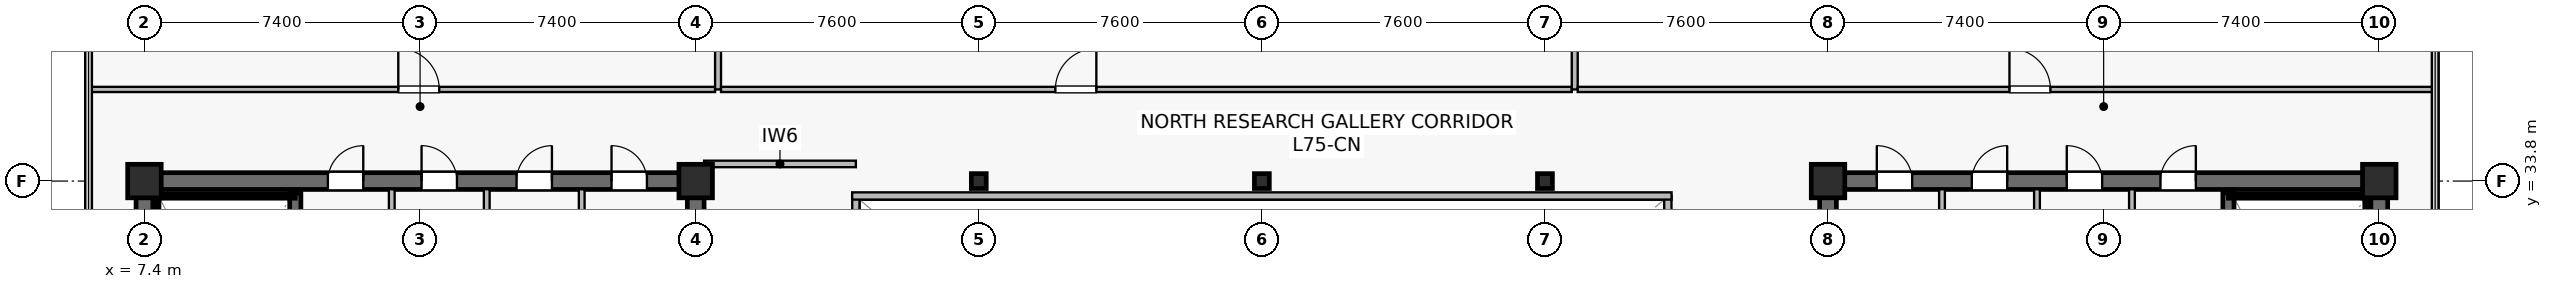
"""IFC4 building model, lengths in metres.
Left out: names, types, materials, properties, quantities, classifications, styles, units other than length and angle.
Written with IfcOpenShell. Run it as: python <this file> out.ifc"""

import sys

from ifc_helpers import new_model, si_unit, direction, frame, frame_2d, origin, origin_2d, place, context, subcontext, project, spatial, rectangle, i_section, extrude, source, transform, mapped, element, fill, save


model = new_model("IFC4")
c1 = context("Model", 3, precision=1e-05, world=origin(), true_north=direction((0.0, 1.0)))
c2 = subcontext(c1, "Body", "Model", "MODEL_VIEW")
j1 = project(units=[si_unit("LENGTHUNIT", "METRE"), si_unit("PLANEANGLEUNIT", "RADIAN")], contexts=[c1])
p1 = place(None, origin())
s1 = spatial("IfcSite", under=j1, at=p1, CompositionType="ELEMENT")
p2 = place(p1, origin())
s2 = spatial("IfcBuilding", under=s1, at=p2, CompositionType="ELEMENT")
p3 = place(p2, frame((0.0, 0.0, 314.4)))
s3 = spatial("IfcBuildingStorey", under=s2, at=p3, CompositionType="ELEMENT", Elevation=314.4)
p4 = place(p3, frame((7.175, 33.8, 0.0), z_axis=(0.0, 0.0, 1.0), x_axis=(1.0, 0.0, 0.0)))
e1 = element("IfcWall", 1, at=p4, inside=s3, PredefinedType="SHEAR", context=c2, shape_type="SweptSolid", body=[
    extrude(rectangle(XDim=15.25, YDim=0.45, at=frame_2d((7.625, 0.0))), origin(), (0.0, 0.0, 1.0), 3.9),
])
p5 = place(p4, frame((5.15, 0.0, 0.0)))
e2 = element("IfcOpeningElement", 2, at=p5, cuts=e1, PredefinedType="OPENING", context=c2, shape_type="SweptSolid", body=[
    extrude(rectangle(XDim=0.95, YDim=2.15, at=frame_2d((0.475, 1.075))), frame((0.0, 0.235, 0.0), z_axis=(0.0, -1.0, 0.0), x_axis=(1.0, 0.0, 0.0)), (0.0, 0.0, 1.0), 0.47),
])
p6 = place(p4, frame((7.665, 0.0, 0.0)))
e3 = element("IfcOpeningElement", 3, at=p6, cuts=e1, PredefinedType="OPENING", context=c2, shape_type="SweptSolid", body=[
    extrude(rectangle(XDim=0.95, YDim=2.15, at=frame_2d((0.475, 1.075))), frame((0.0, 0.235, 0.0), z_axis=(0.0, -1.0, 0.0), x_axis=(1.0, 0.0, 0.0)), (0.0, 0.0, 1.0), 0.47),
])
p7 = place(p4, frame((10.215, 0.0, 0.0)))
e4 = element("IfcOpeningElement", 4, at=p7, cuts=e1, PredefinedType="OPENING", context=c2, shape_type="SweptSolid", body=[
    extrude(rectangle(XDim=0.95, YDim=2.15, at=frame_2d((0.475, 1.075))), frame((0.0, 0.235, 0.0), z_axis=(0.0, -1.0, 0.0), x_axis=(1.0, 0.0, 0.0)), (0.0, 0.0, 1.0), 0.47),
])
p8 = place(p4, frame((12.765, 0.0, 0.0)))
e5 = element("IfcOpeningElement", 5, at=p8, cuts=e1, PredefinedType="OPENING", context=c2, shape_type="SweptSolid", body=[
    extrude(rectangle(XDim=0.95, YDim=2.15, at=frame_2d((0.475, 1.075))), frame((0.0, 0.235, 0.0), z_axis=(0.0, -1.0, 0.0), x_axis=(1.0, 0.0, 0.0)), (0.0, 0.0, 1.0), 0.47),
])
p9 = place(p3, frame((7.4, 15.025, 0.0), z_axis=(0.0, 0.0, 1.0), x_axis=(0.0, 1.0, 0.0)))
e6 = element("IfcWall", 6, at=p9, inside=s3, PredefinedType="SHEAR", context=c2, shape_type="SweptSolid", body=[
    extrude(rectangle(XDim=18.55, YDim=0.45, at=frame_2d((9.275, 0.0))), origin(), (0.0, 0.0, 1.0), 3.9),
])
p10 = place(p3, frame((22.2, 15.025, 0.0), z_axis=(0.0, 0.0, 1.0), x_axis=(0.0, 1.0, 0.0)))
e7 = element("IfcWall", 7, at=p10, inside=s3, PredefinedType="SHEAR", context=c2, shape_type="SweptSolid", body=[
    extrude(rectangle(XDim=18.55, YDim=0.45, at=frame_2d((9.275, 0.0))), origin(), (0.0, 0.0, 1.0), 3.9),
])
p11 = place(p10, frame((3.525, 0.0, 0.0)))
e8 = element("IfcOpeningElement", 8, at=p11, cuts=e7, PredefinedType="OPENING", context=c2, shape_type="SweptSolid", body=[
    extrude(rectangle(XDim=1.42, YDim=2.2, at=frame_2d((0.71, 1.1))), frame((0.0, 0.235, 0.0), z_axis=(0.0, -1.0, 0.0), x_axis=(1.0, 0.0, 0.0)), (0.0, 0.0, 1.0), 0.47),
])
p12 = place(p3, frame((11.45, 24.85, 0.0), z_axis=(0.0, 0.0, 1.0), x_axis=(0.0, 1.0, 0.0)))
e9 = element("IfcWall", 9, at=p12, inside=s3, PredefinedType="SHEAR", context=c2, shape_type="SweptSolid", body=[
    extrude(rectangle(XDim=8.63, YDim=0.3, at=frame_2d((4.315, 0.0))), origin(), (0.0, 0.0, 1.0), 3.9),
])
p13 = place(p12, frame((0.42, 0.0, 0.0)))
e10 = element("IfcOpeningElement", 10, at=p13, cuts=e9, PredefinedType="OPENING", context=c2, shape_type="SweptSolid", body=[
    extrude(rectangle(XDim=1.1, YDim=2.15, at=frame_2d((0.55, 1.075))), frame((0.0, 0.16, 0.0), z_axis=(0.0, -1.0, 0.0), x_axis=(1.0, 0.0, 0.0)), (0.0, 0.0, 1.0), 0.32),
])
p14 = place(p3, frame((7.73, 33.4, 0.0), z_axis=(0.0, 0.0, 1.0), x_axis=(1.0, 0.0, 0.0)))
e11 = element("IfcWall", 11, at=p14, inside=s3, PredefinedType="SOLIDWALL", context=c2, shape_type="SweptSolid", body=[
    extrude(rectangle(XDim=3.72, YDim=0.12, at=frame_2d((1.86, 0.0))), origin(), (0.0, 0.0, 1.0), 3.9),
])
p15 = place(p3, frame((7.73, 25.0, 0.0), z_axis=(0.0, 0.0, 1.0), x_axis=(0.0, 1.0, 0.0)))
e12 = element("IfcWall", 12, at=p15, inside=s3, PredefinedType="SOLIDWALL", context=c2, shape_type="SweptSolid", body=[
    extrude(rectangle(XDim=8.32, YDim=0.12, at=frame_2d((4.16, 0.0))), origin(), (0.0, 0.0, 1.0), 3.9),
])
p16 = place(p3, frame((52.375, 33.8, 0.0), z_axis=(0.0, 0.0, 1.0), x_axis=(1.0, 0.0, 0.0)))
e13 = element("IfcWall", 13, at=p16, inside=s3, PredefinedType="SHEAR", context=c2, shape_type="SweptSolid", body=[
    extrude(rectangle(XDim=15.25, YDim=0.45, at=frame_2d((7.625, 0.0))), origin(), (0.0, 0.0, 1.0), 3.9),
])
p17 = place(p16, frame((9.15, 0.0, 0.0)))
e14 = element("IfcOpeningElement", 14, at=p17, cuts=e13, PredefinedType="OPENING", context=c2, shape_type="SweptSolid", body=[
    extrude(rectangle(XDim=0.95, YDim=2.15, at=frame_2d((0.475, 1.075))), frame((0.0, 0.235, 0.0), z_axis=(0.0, -1.0, 0.0), x_axis=(1.0, 0.0, 0.0)), (0.0, 0.0, 1.0), 0.47),
])
p18 = place(p16, frame((6.635, 0.0, 0.0)))
e15 = element("IfcOpeningElement", 15, at=p18, cuts=e13, PredefinedType="OPENING", context=c2, shape_type="SweptSolid", body=[
    extrude(rectangle(XDim=0.95, YDim=2.15, at=frame_2d((0.475, 1.075))), frame((0.0, 0.235, 0.0), z_axis=(0.0, -1.0, 0.0), x_axis=(1.0, 0.0, 0.0)), (0.0, 0.0, 1.0), 0.47),
])
p19 = place(p16, frame((4.085, 0.0, 0.0)))
e16 = element("IfcOpeningElement", 16, at=p19, cuts=e13, PredefinedType="OPENING", context=c2, shape_type="SweptSolid", body=[
    extrude(rectangle(XDim=0.95, YDim=2.15, at=frame_2d((0.475, 1.075))), frame((0.0, 0.235, 0.0), z_axis=(0.0, -1.0, 0.0), x_axis=(1.0, 0.0, 0.0)), (0.0, 0.0, 1.0), 0.47),
])
p20 = place(p16, frame((1.535, 0.0, 0.0)))
e17 = element("IfcOpeningElement", 17, at=p20, cuts=e13, PredefinedType="OPENING", context=c2, shape_type="SweptSolid", body=[
    extrude(rectangle(XDim=0.95, YDim=2.15, at=frame_2d((0.475, 1.075))), frame((0.0, 0.235, 0.0), z_axis=(0.0, -1.0, 0.0), x_axis=(1.0, 0.0, 0.0)), (0.0, 0.0, 1.0), 0.47),
])
p21 = place(p3, frame((52.6, 15.025, 0.0), z_axis=(0.0, 0.0, 1.0), x_axis=(0.0, 1.0, 0.0)))
e18 = element("IfcWall", 18, at=p21, inside=s3, PredefinedType="SHEAR", context=c2, shape_type="SweptSolid", body=[
    extrude(rectangle(XDim=18.55, YDim=0.45, at=frame_2d((9.275, 0.0))), origin(), (0.0, 0.0, 1.0), 3.9),
])
p22 = place(p21, frame((3.525, 0.0, 0.0)))
e19 = element("IfcOpeningElement", 19, at=p22, cuts=e18, PredefinedType="OPENING", context=c2, shape_type="SweptSolid", body=[
    extrude(rectangle(XDim=1.42, YDim=2.2, at=frame_2d((0.71, 1.1))), frame((0.0, 0.235, 0.0), z_axis=(0.0, -1.0, 0.0), x_axis=(1.0, 0.0, 0.0)), (0.0, 0.0, 1.0), 0.47),
])
p23 = place(p3, frame((67.4, 15.025, 0.0), z_axis=(0.0, 0.0, 1.0), x_axis=(0.0, 1.0, 0.0)))
e20 = element("IfcWall", 20, at=p23, inside=s3, PredefinedType="SHEAR", context=c2, shape_type="SweptSolid", body=[
    extrude(rectangle(XDim=18.55, YDim=0.45, at=frame_2d((9.275, 0.0))), origin(), (0.0, 0.0, 1.0), 3.9),
])
p24 = place(p3, frame((63.35, 24.85, 0.0), z_axis=(0.0, 0.0, 1.0), x_axis=(0.0, 1.0, 0.0)))
e21 = element("IfcWall", 21, at=p24, inside=s3, PredefinedType="SHEAR", context=c2, shape_type="SweptSolid", body=[
    extrude(rectangle(XDim=8.63, YDim=0.3, at=frame_2d((4.315, 0.0))), origin(), (0.0, 0.0, 1.0), 3.9),
])
p25 = place(p24, frame((0.42, 0.0, 0.0)))
e22 = element("IfcOpeningElement", 22, at=p25, cuts=e21, PredefinedType="OPENING", context=c2, shape_type="SweptSolid", body=[
    extrude(rectangle(XDim=1.1, YDim=2.15, at=frame_2d((0.55, 1.075))), frame((0.0, 0.16, 0.0), z_axis=(0.0, -1.0, 0.0), x_axis=(1.0, 0.0, 0.0)), (0.0, 0.0, 1.0), 0.32),
])
p26 = place(p3, frame((63.35, 33.4, 0.0), z_axis=(0.0, 0.0, 1.0), x_axis=(1.0, 0.0, 0.0)))
e23 = element("IfcWall", 23, at=p26, inside=s3, PredefinedType="SOLIDWALL", context=c2, shape_type="SweptSolid", body=[
    extrude(rectangle(XDim=3.72, YDim=0.12, at=frame_2d((1.86, 0.0))), origin(), (0.0, 0.0, 1.0), 3.9),
])
p27 = place(p3, frame((67.07, 25.0, 0.0), z_axis=(0.0, 0.0, 1.0), x_axis=(0.0, 1.0, 0.0)))
e24 = element("IfcWall", 24, at=p27, inside=s3, PredefinedType="SOLIDWALL", context=c2, shape_type="SweptSolid", body=[
    extrude(rectangle(XDim=8.32, YDim=0.12, at=frame_2d((4.16, 0.0))), origin(), (0.0, 0.0, 1.0), 3.9),
])
m1 = source(origin(), c2, "Body", "SweptSolid", [
    extrude(rectangle(XDim=0.9, YDim=0.9, at=origin_2d()), origin(), (0.0, 0.0, 1.0), 4.2),
])
for number, where, z_axis, x_axis in (
    (25, (7.4, 33.8, 0.0), (0.0, 0.0, 1.0), (1.0, 0.0, 0.0)),
    (26, (22.2, 33.8, 0.0), (0.0, 0.0, 1.0), (1.0, 0.0, 0.0)),
    (27, (52.6, 33.8, 0.0), (0.0, 0.0, 1.0), (1.0, 0.0, 0.0)),
    (28, (67.4, 33.8, 0.0), (0.0, 0.0, 1.0), (1.0, 0.0, 0.0)),
):
    element("IfcColumn", number, at=place(p3, frame(where, z_axis=z_axis, x_axis=x_axis)), inside=s3, PredefinedType="COLUMN", context=c2, shape_type="MappedRepresentation", body=[
        mapped(m1, transform((0.0, 0.0, 0.0), scale=1.0)),
    ])
m2 = source(origin(), c2, "Body", "SweptSolid", [
    extrude(i_section(OverallWidth=0.4, OverallDepth=0.4, WebThickness=0.021, FlangeThickness=0.021, at=origin_2d()), origin(), (0.0, 0.0, 1.0), 4.2),
])
for number, where, z_axis, x_axis in (
    (29, (29.8, 33.8, 0.0), (0.0, 0.0, 1.0), (1.0, 0.0, 0.0)),
    (30, (37.4, 33.8, 0.0), (0.0, 0.0, 1.0), (1.0, 0.0, 0.0)),
    (31, (45.0, 33.8, 0.0), (0.0, 0.0, 1.0), (1.0, 0.0, 0.0)),
):
    element("IfcColumn", number, at=place(p3, frame(where, z_axis=z_axis, x_axis=x_axis)), inside=s3, PredefinedType="COLUMN", context=c2, shape_type="MappedRepresentation", body=[
        mapped(m2, transform((0.0, 0.0, 0.0), scale=1.0)),
    ])
for number, where, z_axis, x_axis in (
    (32, (14.04, 29.65, 0.0), (0.0, 0.0, 1.0), (0.0, 1.0, 0.0)),
    (33, (16.59, 29.65, 0.0), (0.0, 0.0, 1.0), (0.0, 1.0, 0.0)),
    (34, (19.14, 29.65, 0.0), (0.0, 0.0, 1.0), (0.0, 1.0, 0.0)),
    (35, (60.76, 29.65, 0.0), (0.0, 0.0, 1.0), (0.0, 1.0, 0.0)),
    (36, (58.21, 29.65, 0.0), (0.0, 0.0, 1.0), (0.0, 1.0, 0.0)),
    (37, (55.66, 29.65, 0.0), (0.0, 0.0, 1.0), (0.0, 1.0, 0.0)),
):
    element("IfcWall", number, at=place(p3, frame(where, z_axis=z_axis, x_axis=x_axis)), inside=s3, PredefinedType="PLUMBINGWALL", context=c2, shape_type="SweptSolid", body=[
        extrude(rectangle(XDim=3.93, YDim=0.155, at=frame_2d((1.965, 0.0))), origin(), (0.0, 0.0, 1.0), 3.9),
    ])
p28 = place(p3, frame((22.425, 34.26, 0.0), z_axis=(0.0, 0.0, 1.0), x_axis=(1.0, 0.0, 0.0)))
e38 = element("IfcWall", 38, at=p28, inside=s3, PredefinedType="PARTITIONING", context=c2, shape_type="SweptSolid", body=[
    extrude(rectangle(XDim=4.075, YDim=0.175, at=frame_2d((2.038, 0.0))), origin(), (0.0, 0.0, 1.0), 3.635),
])
p29 = place(p3, frame((26.5, 15.2, 0.0), z_axis=(0.0, 0.0, 1.0), x_axis=(0.0, 1.0, 0.0)))
e39 = element("IfcWall", 39, at=p29, inside=s3, PredefinedType="SOLIDWALL", context=c2, shape_type="SweptSolid", body=[
    extrude(rectangle(XDim=18.2, YDim=0.195, at=frame_2d((9.1, 0.0))), origin(), (0.0, 0.0, 1.0), 3.9),
])
p30 = place(p29, frame((1.8, 0.0, 0.9)))
e40 = element("IfcOpeningElement", 40, at=p30, cuts=e39, PredefinedType="OPENING", context=c2, shape_type="SweptSolid", body=[
    extrude(rectangle(XDim=1.2, YDim=1.35, at=frame_2d((0.6, 0.675))), frame((0.0, 0.107, 0.0), z_axis=(0.0, -1.0, 0.0), x_axis=(1.0, 0.0, 0.0)), (0.0, 0.0, 1.0), 0.215),
])
p31 = place(p29, frame((13.2, 0.0, 0.9)))
e41 = element("IfcOpeningElement", 41, at=p31, cuts=e39, PredefinedType="OPENING", context=c2, shape_type="SweptSolid", body=[
    extrude(rectangle(XDim=1.2, YDim=1.35, at=frame_2d((0.6, 0.675))), frame((0.0, 0.107, 0.0), z_axis=(0.0, -1.0, 0.0), x_axis=(1.0, 0.0, 0.0)), (0.0, 0.0, 1.0), 0.215),
])
p32 = place(p3, frame((48.3, 15.2, 0.0), z_axis=(0.0, 0.0, 1.0), x_axis=(0.0, 1.0, 0.0)))
e42 = element("IfcWall", 42, at=p32, inside=s3, PredefinedType="SOLIDWALL", context=c2, shape_type="SweptSolid", body=[
    extrude(rectangle(XDim=18.2, YDim=0.195, at=frame_2d((9.1, 0.0))), origin(), (0.0, 0.0, 1.0), 3.9),
])
p33 = place(p32, frame((1.8, 0.0, 0.9)))
e43 = element("IfcOpeningElement", 43, at=p33, cuts=e42, PredefinedType="OPENING", context=c2, shape_type="SweptSolid", body=[
    extrude(rectangle(XDim=1.2, YDim=1.35, at=frame_2d((0.6, 0.675))), frame((0.0, 0.107, 0.0), z_axis=(0.0, -1.0, 0.0), x_axis=(1.0, 0.0, 0.0)), (0.0, 0.0, 1.0), 0.215),
])
p34 = place(p32, frame((13.2, 0.0, 0.9)))
e44 = element("IfcOpeningElement", 44, at=p34, cuts=e42, PredefinedType="OPENING", context=c2, shape_type="SweptSolid", body=[
    extrude(rectangle(XDim=1.2, YDim=1.35, at=frame_2d((0.6, 0.675))), frame((0.0, 0.107, 0.0), z_axis=(0.0, -1.0, 0.0), x_axis=(1.0, 0.0, 0.0)), (0.0, 0.0, 1.0), 0.215),
])
p35 = place(p3, frame((26.4, 33.4, 0.0), z_axis=(0.0, 0.0, 1.0), x_axis=(1.0, 0.0, 0.0)))
e45 = element("IfcWall", 45, at=p35, inside=s3, PredefinedType="SOLIDWALL", context=c2, shape_type="SweptSolid", body=[
    extrude(rectangle(XDim=22.0, YDim=0.195, at=frame_2d((11.0, 0.0))), origin(), (0.0, 0.0, 1.0), 3.9),
])
p36 = place(p3, frame((5.91, 36.26, 0.0), z_axis=(0.0, 0.0, 1.0), x_axis=(1.0, 0.0, 0.0)))
e46 = element("IfcWall", 46, at=p36, inside=s3, PredefinedType="PARTITIONING", context=c2, shape_type="SweptSolid", body=[
    extrude(rectangle(XDim=16.81, YDim=0.14, at=frame_2d((8.405, 0.0))), origin(), (0.0, 0.0, 1.0), 3.297),
])
p37 = place(p36, frame((8.305, 0.0, 0.0)))
e47 = element("IfcOpeningElement", 47, at=p37, cuts=e46, PredefinedType="OPENING", context=c2, shape_type="SweptSolid", body=[
    extrude(rectangle(XDim=1.1, YDim=2.18, at=frame_2d((0.55, 1.09))), frame((0.0, 0.08, 0.0), z_axis=(0.0, -1.0, 0.0), x_axis=(1.0, 0.0, 0.0)), (0.0, 0.0, 1.0), 0.16),
])
p38 = place(p3, frame((22.8, 36.26, 0.0), z_axis=(0.0, 0.0, 1.0), x_axis=(0.0, 1.0, 0.0)))
e48 = element("IfcWall", 48, at=p38, inside=s3, PredefinedType="PARTITIONING", context=c2, shape_type="SweptSolid", body=[
    extrude(rectangle(XDim=8.53, YDim=0.16, at=frame_2d((4.265, 0.0))), origin(), (0.0, 0.0, 1.0), 2.985),
])
p39 = place(p3, frame((22.88, 36.26, 0.0), z_axis=(0.0, 0.0, 1.0), x_axis=(1.0, 0.0, 0.0)))
e49 = element("IfcWall", 49, at=p39, inside=s3, PredefinedType="PARTITIONING", context=c2, shape_type="SweptSolid", body=[
    extrude(rectangle(XDim=22.84, YDim=0.14, at=frame_2d((11.42, 0.0))), origin(), (0.0, 0.0, 1.0), 3.297),
])
p40 = place(p39, frame((8.976, 0.0, 0.0)))
e50 = element("IfcOpeningElement", 50, at=p40, cuts=e49, PredefinedType="OPENING", context=c2, shape_type="SweptSolid", body=[
    extrude(rectangle(XDim=1.1, YDim=2.18, at=frame_2d((0.55, 1.09))), frame((0.0, 0.08, 0.0), z_axis=(0.0, -1.0, 0.0), x_axis=(1.0, 0.0, 0.0)), (0.0, 0.0, 1.0), 0.16),
])
p41 = place(p3, frame((45.8, 36.26, 0.0), z_axis=(0.0, 0.0, 1.0), x_axis=(0.0, 1.0, 0.0)))
e51 = element("IfcWall", 51, at=p41, inside=s3, PredefinedType="PARTITIONING", context=c2, shape_type="SweptSolid", body=[
    extrude(rectangle(XDim=7.53, YDim=0.16, at=frame_2d((3.765, 0.0))), origin(), (0.0, 0.0, 1.0), 2.985),
])
p42 = place(p3, frame((45.88, 36.26, 0.0), z_axis=(0.0, 0.0, 1.0), x_axis=(1.0, 0.0, 0.0)))
e52 = element("IfcWall", 52, at=p42, inside=s3, PredefinedType="PARTITIONING", context=c2, shape_type="SweptSolid", body=[
    extrude(rectangle(XDim=23.01, YDim=0.14, at=frame_2d((11.505, 0.0))), origin(), (0.0, 0.0, 1.0), 3.297),
])
p43 = place(p42, frame((11.591, 0.0, 0.0)))
e53 = element("IfcOpeningElement", 53, at=p43, cuts=e52, PredefinedType="OPENING", context=c2, shape_type="SweptSolid", body=[
    extrude(rectangle(XDim=1.1, YDim=2.18, at=frame_2d((0.55, 1.09))), frame((0.0, 0.08, 0.0), z_axis=(0.0, -1.0, 0.0), x_axis=(1.0, 0.0, 0.0)), (0.0, 0.0, 1.0), 0.16),
])
m3 = source(origin(), c2, "Body", "SweptSolid", [
    extrude(rectangle(XDim=0.95, YDim=2.15, at=frame_2d((0.475, 1.075))), frame((0.0, 0.025, 0.0), z_axis=(0.0, -1.0, 0.0), x_axis=(1.0, 0.0, 0.0)), (0.0, 0.0, 1.0), 0.05),
])
p44 = place(p5, origin())
e54 = element("IfcDoor", 54, at=p44, inside=s3, OperationType="SINGLE_SWING_RIGHT", PredefinedType="DOOR", context=c2, shape_type="MappedRepresentation", body=[
    mapped(m3, transform((0.0, 0.0, 0.0), scale=1.0)),
])
fill(e2, e54)
p45 = place(p6, origin())
e55 = element("IfcDoor", 55, at=p45, inside=s3, OperationType="SINGLE_SWING_LEFT", PredefinedType="DOOR", context=c2, shape_type="MappedRepresentation", body=[
    mapped(m3, transform((0.0, 0.0, 0.0), scale=1.0)),
])
fill(e3, e55)
p46 = place(p7, origin())
e56 = element("IfcDoor", 56, at=p46, inside=s3, OperationType="SINGLE_SWING_RIGHT", PredefinedType="DOOR", context=c2, shape_type="MappedRepresentation", body=[
    mapped(m3, transform((0.0, 0.0, 0.0), scale=1.0)),
])
fill(e4, e56)
p47 = place(p8, origin())
e57 = element("IfcDoor", 57, at=p47, inside=s3, OperationType="SINGLE_SWING_LEFT", PredefinedType="DOOR", context=c2, shape_type="MappedRepresentation", body=[
    mapped(m3, transform((0.0, 0.0, 0.0), scale=1.0)),
])
fill(e5, e57)
p48 = place(p17, origin())
e58 = element("IfcDoor", 58, at=p48, inside=s3, OperationType="SINGLE_SWING_RIGHT", PredefinedType="DOOR", context=c2, shape_type="MappedRepresentation", body=[
    mapped(m3, transform((0.0, 0.0, 0.0), scale=1.0)),
])
fill(e14, e58)
p49 = place(p18, origin())
e59 = element("IfcDoor", 59, at=p49, inside=s3, OperationType="SINGLE_SWING_LEFT", PredefinedType="DOOR", context=c2, shape_type="MappedRepresentation", body=[
    mapped(m3, transform((0.0, 0.0, 0.0), scale=1.0)),
])
fill(e15, e59)
p50 = place(p19, origin())
e60 = element("IfcDoor", 60, at=p50, inside=s3, OperationType="SINGLE_SWING_RIGHT", PredefinedType="DOOR", context=c2, shape_type="MappedRepresentation", body=[
    mapped(m3, transform((0.0, 0.0, 0.0), scale=1.0)),
])
fill(e16, e60)
p51 = place(p20, origin())
e61 = element("IfcDoor", 61, at=p51, inside=s3, OperationType="SINGLE_SWING_LEFT", PredefinedType="DOOR", context=c2, shape_type="MappedRepresentation", body=[
    mapped(m3, transform((0.0, 0.0, 0.0), scale=1.0)),
])
fill(e17, e61)
m4 = source(origin(), c2, "Body", "SweptSolid", [
    extrude(rectangle(XDim=1.1, YDim=2.18, at=frame_2d((0.55, 1.09))), frame((0.0, 0.025, 0.0), z_axis=(0.0, -1.0, 0.0), x_axis=(1.0, 0.0, 0.0)), (0.0, 0.0, 1.0), 0.05),
])
p52 = place(p37, origin())
e62 = element("IfcDoor", 62, at=p52, inside=s3, OperationType="SINGLE_SWING_LEFT", PredefinedType="DOOR", context=c2, shape_type="MappedRepresentation", body=[
    mapped(m4, transform((0.0, 0.0, 0.0), scale=1.0)),
])
fill(e47, e62)
p53 = place(p40, origin())
e63 = element("IfcDoor", 63, at=p53, inside=s3, OperationType="SINGLE_SWING_RIGHT", PredefinedType="DOOR", context=c2, shape_type="MappedRepresentation", body=[
    mapped(m4, transform((0.0, 0.0, 0.0), scale=1.0)),
])
fill(e50, e63)
p54 = place(p43, origin())
e64 = element("IfcDoor", 64, at=p54, inside=s3, OperationType="SINGLE_SWING_LEFT", PredefinedType="DOOR", context=c2, shape_type="MappedRepresentation", body=[
    mapped(m4, transform((0.0, 0.0, 0.0), scale=1.0)),
])
fill(e53, e64)
save(model, sys.argv[1])
